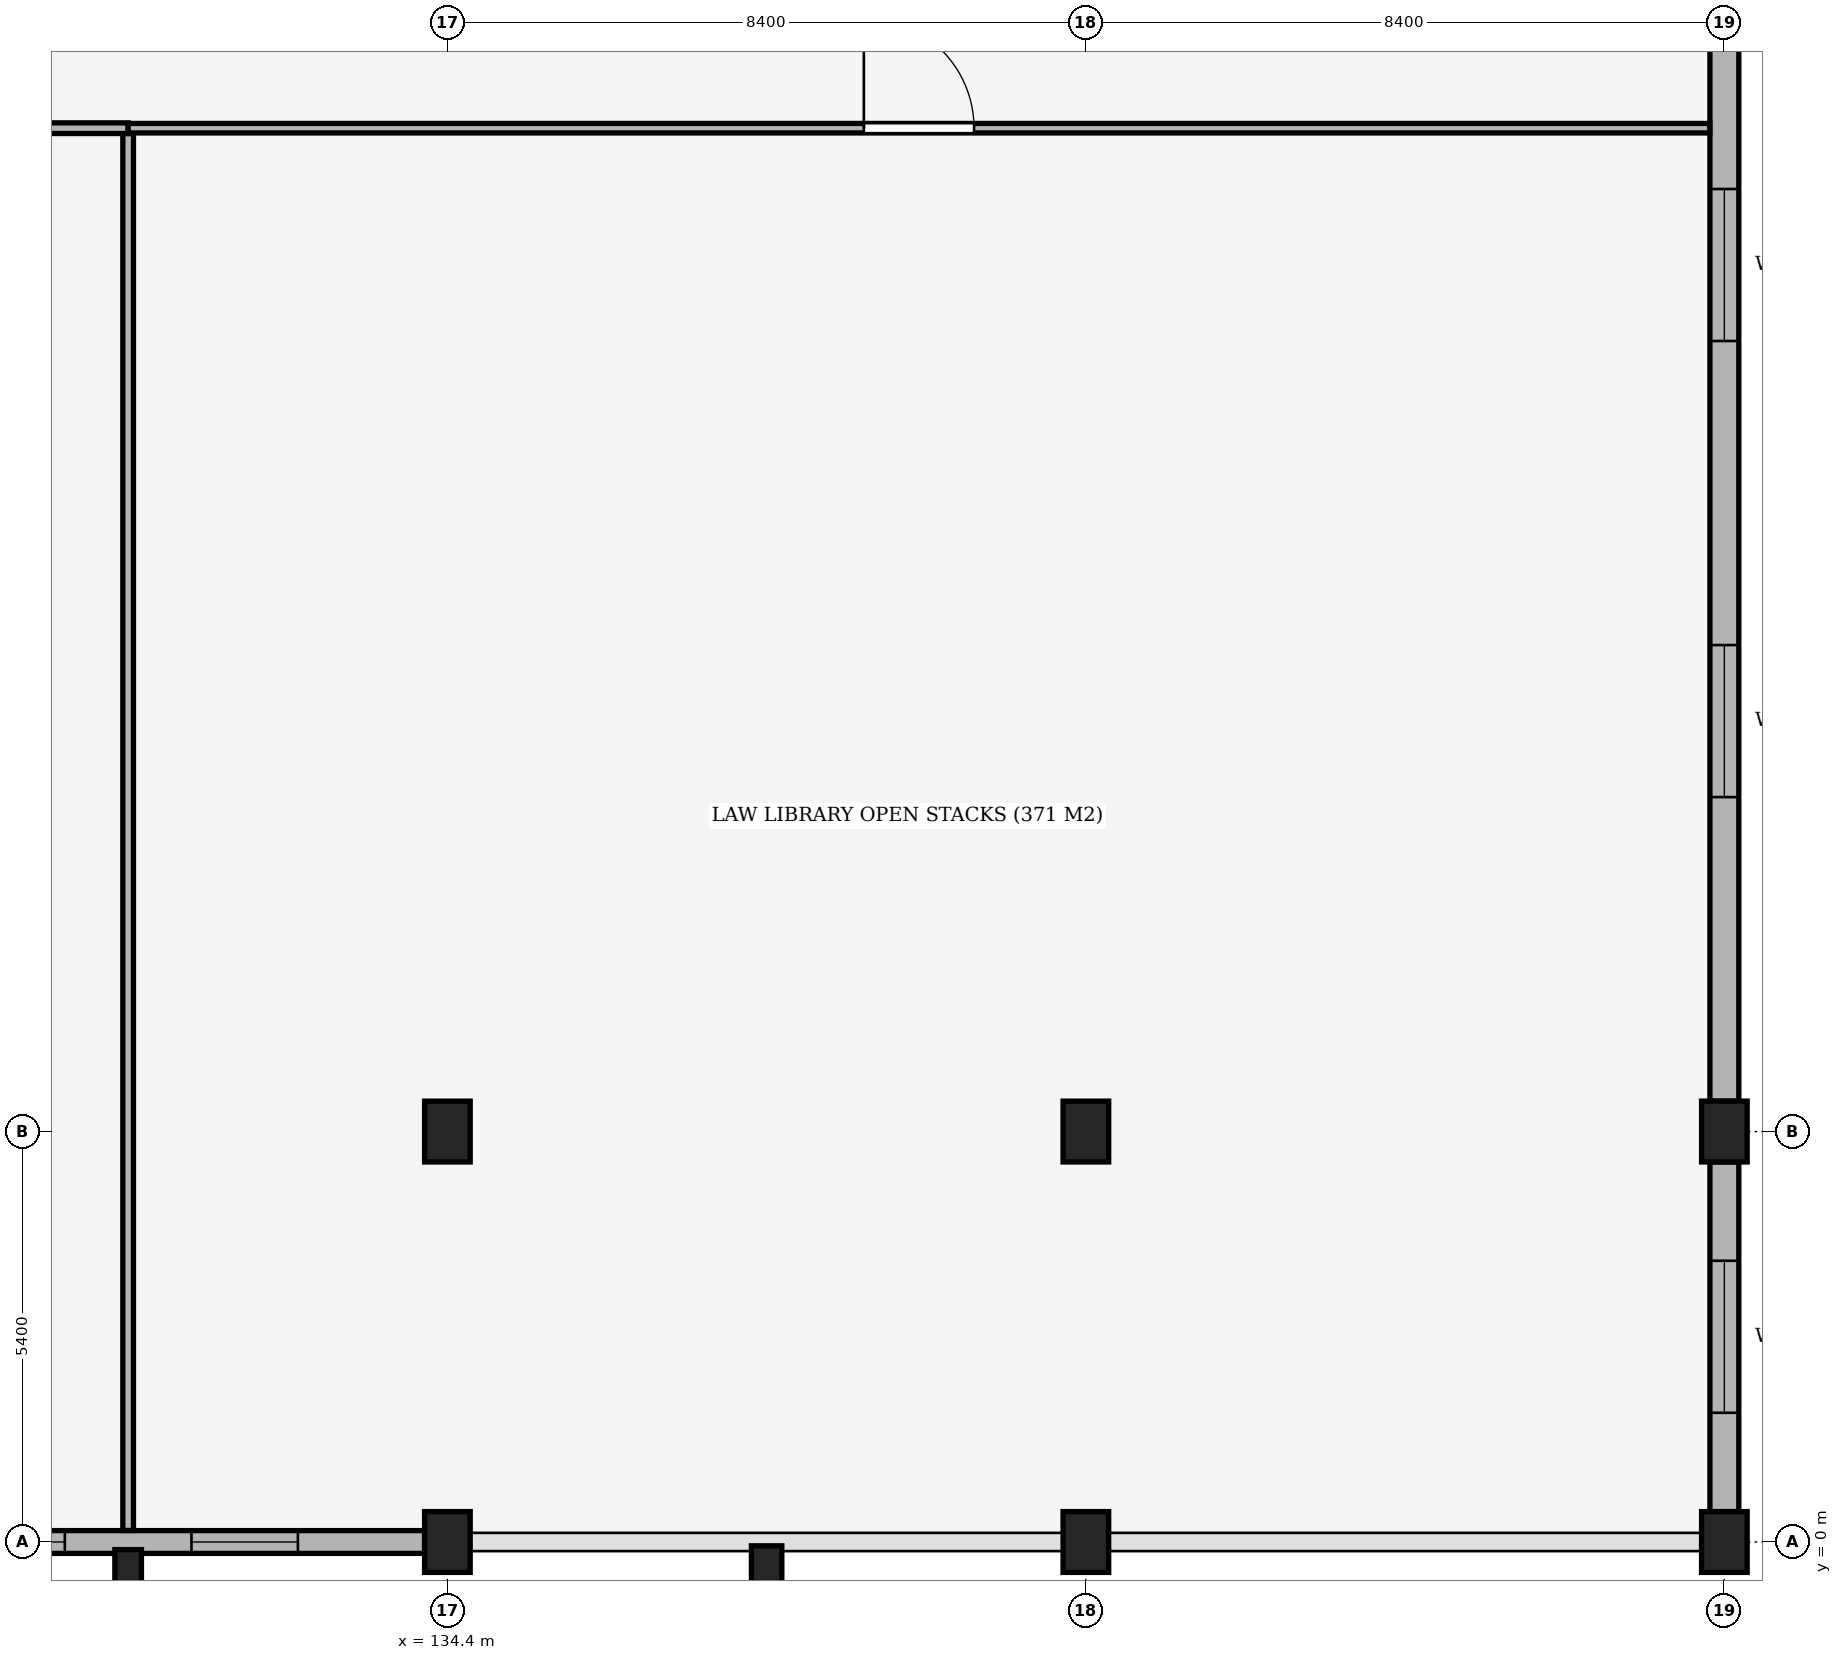
"""IFC4 building model, lengths in metres.
Left out: names, types, materials, properties, quantities, classifications, styles, units other than length and angle.
Written with IfcOpenShell. Run it as: python <this file> out.ifc"""

import sys

from ifc_helpers import new_model, si_unit, direction, frame, frame_2d, origin, origin_2d, place, context, subcontext, project, spatial, rectangle, extrude, element, fill, save


model = new_model("IFC4")
c1 = context("Model", 3, precision=1e-05, world=origin(), true_north=direction((0.0, 1.0)))
c2 = subcontext(c1, "Body", "Model", "MODEL_VIEW")
j1 = project(units=[si_unit("LENGTHUNIT", "METRE"), si_unit("PLANEANGLEUNIT", "RADIAN")], contexts=[c1])
p1 = place(None, origin())
s1 = spatial("IfcSite", under=j1, at=p1, CompositionType="ELEMENT")
p2 = place(p1, origin())
s2 = spatial("IfcBuilding", under=s1, at=p2, CompositionType="ELEMENT")
p3 = place(p2, frame((0.0, 0.0, 5.1)))
s3 = spatial("IfcBuildingStorey", under=s2, at=p3, CompositionType="ELEMENT", Elevation=5.1)
for number, where, z_axis, x_axis in (
    (1, (134.4, 0.0, 0.0), (0.0, 0.0, 1.0), (1.0, 0.0, 0.0)),
    (2, (134.4, 5.4, 0.0), (0.0, 0.0, 1.0), (1.0, 0.0, 0.0)),
    (3, (142.8, 0.0, 0.0), (0.0, 0.0, 1.0), (1.0, 0.0, 0.0)),
    (4, (142.8, 5.4, 0.0), (0.0, 0.0, 1.0), (1.0, 0.0, 0.0)),
    (5, (151.2, 0.0, 0.0), (0.0, 0.0, 1.0), (1.0, 0.0, 0.0)),
    (6, (151.2, 5.4, 0.0), (0.0, 0.0, 1.0), (1.0, 0.0, 0.0)),
):
    element("IfcColumn", number, at=place(p3, frame(where, z_axis=z_axis, x_axis=x_axis)), inside=s3, PredefinedType="COLUMN", context=c2, shape_type="SweptSolid", body=[
        extrude(rectangle(XDim=0.6, YDim=0.8, at=origin_2d()), origin(), (0.0, 0.0, 1.0), 5.1),
    ])
p4 = place(p3, frame((130.2, -0.35, 0.0), z_axis=(0.0, 0.0, 1.0), x_axis=(1.0, 0.0, 0.0)))
e7 = element("IfcColumn", 7, at=p4, inside=s3, PredefinedType="PILASTER", context=c2, shape_type="SweptSolid", body=[
    extrude(rectangle(XDim=0.35, YDim=0.5, at=origin_2d()), origin(), (0.0, 0.0, 1.0), 5.1),
])
p5 = place(p3, frame((138.6, -0.35, 0.0), z_axis=(0.0, 0.0, 1.0), x_axis=(1.0, 0.0, 0.0)))
e8 = element("IfcColumn", 8, at=p5, inside=s3, PredefinedType="PILASTER", context=c2, shape_type="SweptSolid", body=[
    extrude(rectangle(XDim=0.4, YDim=0.6, at=origin_2d()), origin(), (0.0, 0.0, 1.0), 5.1),
])
p6 = place(p3, frame((151.2, 21.8, 0.0), z_axis=(0.0, 0.0, 1.0), x_axis=(0.0, -1.0, 0.0)))
e9 = element("IfcWall", 9, at=p6, inside=s3, PredefinedType="SOLIDWALL", context=c2, shape_type="SweptSolid", body=[
    extrude(rectangle(XDim=16.0, YDim=0.38, at=frame_2d((8.0, 0.0))), origin(), (0.0, 0.0, 1.0), 3.67),
])
p7 = place(p6, frame((4.0, 0.0, 2.1)))
e10 = element("IfcOpeningElement", 10, at=p7, cuts=e9, PredefinedType="OPENING", context=c2, shape_type="SweptSolid", body=[
    extrude(rectangle(XDim=2.0, YDim=1.2, at=frame_2d((1.0, 0.6))), frame((0.0, 0.205, 0.0), z_axis=(0.0, -1.0, 0.0), x_axis=(1.0, 0.0, 0.0)), (0.0, 0.0, 1.0), 0.41),
])
p8 = place(p6, frame((10.0, 0.0, 2.1)))
e11 = element("IfcOpeningElement", 11, at=p8, cuts=e9, PredefinedType="OPENING", context=c2, shape_type="SweptSolid", body=[
    extrude(rectangle(XDim=2.0, YDim=1.2, at=frame_2d((1.0, 0.6))), frame((0.0, 0.205, 0.0), z_axis=(0.0, -1.0, 0.0), x_axis=(1.0, 0.0, 0.0)), (0.0, 0.0, 1.0), 0.41),
])
p9 = place(p3, frame((151.2, 5.0, 0.0), z_axis=(0.0, 0.0, 1.0), x_axis=(0.0, -1.0, 0.0)))
e12 = element("IfcWall", 12, at=p9, inside=s3, PredefinedType="SOLIDWALL", context=c2, shape_type="SweptSolid", body=[
    extrude(rectangle(XDim=4.6, YDim=0.38, at=frame_2d((2.3, 0.0))), origin(), (0.0, 0.0, 1.0), 4.27),
])
p10 = place(p9, frame((1.3, 0.0, 2.1)))
e13 = element("IfcOpeningElement", 13, at=p10, cuts=e12, PredefinedType="OPENING", context=c2, shape_type="SweptSolid", body=[
    extrude(rectangle(XDim=2.0, YDim=1.2, at=frame_2d((1.0, 0.6))), frame((0.0, 0.205, 0.0), z_axis=(0.0, -1.0, 0.0), x_axis=(1.0, 0.0, 0.0)), (0.0, 0.0, 1.0), 0.41),
])
p11 = place(p3, frame((134.1, 0.0, 0.0), z_axis=(0.0, 0.0, 1.0), x_axis=(-1.0, 0.0, 0.0)))
e14 = element("IfcWall", 14, at=p11, inside=s3, PredefinedType="SOLIDWALL", context=c2, shape_type="SweptSolid", body=[
    extrude(rectangle(XDim=7.8, YDim=0.3, at=frame_2d((3.9, 0.0))), origin(), (0.0, 0.0, 1.0), 4.07),
])
p12 = place(p11, frame((1.667, 0.0, 0.85)))
e15 = element("IfcOpeningElement", 15, at=p12, cuts=e14, PredefinedType="OPENING", context=c2, shape_type="SweptSolid", body=[
    extrude(rectangle(XDim=1.4, YDim=2.4, at=frame_2d((0.7, 1.2))), frame((0.0, 0.165, 0.0), z_axis=(0.0, -1.0, 0.0), x_axis=(1.0, 0.0, 0.0)), (0.0, 0.0, 1.0), 0.33),
])
p13 = place(p11, frame((4.733, 0.0, 0.85)))
e16 = element("IfcOpeningElement", 16, at=p13, cuts=e14, PredefinedType="OPENING", context=c2, shape_type="SweptSolid", body=[
    extrude(rectangle(XDim=1.4, YDim=2.4, at=frame_2d((0.7, 1.2))), frame((0.0, 0.165, 0.0), z_axis=(0.0, -1.0, 0.0), x_axis=(1.0, 0.0, 0.0)), (0.0, 0.0, 1.0), 0.33),
])
p14 = place(p3, frame((109.6, 18.6, 0.0), z_axis=(0.0, 0.0, 1.0), x_axis=(1.0, 0.0, 0.0)))
e17 = element("IfcWall", 17, at=p14, inside=s3, PredefinedType="PARTITIONING", context=c2, shape_type="SweptSolid", body=[
    extrude(rectangle(XDim=20.6, YDim=0.14, at=frame_2d((10.3, 0.0))), origin(), (0.0, 0.0, 1.0), 3.67),
])
p15 = place(p14, frame((9.675, 0.0, 0.0)))
e18 = element("IfcOpeningElement", 18, at=p15, cuts=e17, PredefinedType="OPENING", context=c2, shape_type="SweptSolid", body=[
    extrude(rectangle(XDim=1.25, YDim=2.2, at=frame_2d((0.625, 1.1))), frame((0.0, 0.085, 0.0), z_axis=(0.0, -1.0, 0.0), x_axis=(1.0, 0.0, 0.0)), (0.0, 0.0, 1.0), 0.17),
])
p16 = place(p3, frame((130.2, 18.6, 0.0), z_axis=(0.0, 0.0, 1.0), x_axis=(1.0, 0.0, 0.0)))
e19 = element("IfcWall", 19, at=p16, inside=s3, PredefinedType="PARTITIONING", context=c2, shape_type="SweptSolid", body=[
    extrude(rectangle(XDim=20.808, YDim=0.125, at=frame_2d((10.404, 0.0))), origin(), (0.0, 0.0, 1.0), 3.67),
])
p17 = place(p16, frame((9.679, 0.0, 0.0)))
e20 = element("IfcOpeningElement", 20, at=p17, cuts=e19, PredefinedType="OPENING", context=c2, shape_type="SweptSolid", body=[
    extrude(rectangle(XDim=1.45, YDim=2.25, at=frame_2d((0.725, 1.125))), frame((0.0, 0.077, 0.0), z_axis=(0.0, -1.0, 0.0), x_axis=(1.0, 0.0, 0.0)), (0.0, 0.0, 1.0), 0.155),
])
p18 = place(p3, frame((130.2, 0.152, 0.0), z_axis=(0.0, 0.0, 1.0), x_axis=(0.0, 1.0, 0.0)))
e21 = element("IfcWall", 21, at=p18, inside=s3, PredefinedType="PARTITIONING", context=c2, shape_type="SweptSolid", body=[
    extrude(rectangle(XDim=18.376, YDim=0.14, at=frame_2d((9.188, 0.0))), origin(), (0.0, 0.0, 1.0), 4.07),
])
p19 = place(p7, origin())
e22 = element("IfcWindow", 22, at=p19, inside=s3, PartitioningType="SINGLE_PANEL", PredefinedType="WINDOW", context=c2, shape_type="SweptSolid", body=[
    extrude(rectangle(XDim=2.0, YDim=1.2, at=frame_2d((1.0, 0.6))), frame((0.0, 0.03, 0.0), z_axis=(0.0, -1.0, 0.0), x_axis=(1.0, 0.0, 0.0)), (0.0, 0.0, 1.0), 0.06),
])
fill(e10, e22)
p20 = place(p8, origin())
e23 = element("IfcWindow", 23, at=p20, inside=s3, PartitioningType="SINGLE_PANEL", PredefinedType="WINDOW", context=c2, shape_type="SweptSolid", body=[
    extrude(rectangle(XDim=2.0, YDim=1.2, at=frame_2d((1.0, 0.6))), frame((0.0, 0.03, 0.0), z_axis=(0.0, -1.0, 0.0), x_axis=(1.0, 0.0, 0.0)), (0.0, 0.0, 1.0), 0.06),
])
fill(e11, e23)
p21 = place(p10, origin())
e24 = element("IfcWindow", 24, at=p21, inside=s3, PartitioningType="SINGLE_PANEL", PredefinedType="WINDOW", context=c2, shape_type="SweptSolid", body=[
    extrude(rectangle(XDim=2.0, YDim=1.2, at=frame_2d((1.0, 0.6))), frame((0.0, 0.03, 0.0), z_axis=(0.0, -1.0, 0.0), x_axis=(1.0, 0.0, 0.0)), (0.0, 0.0, 1.0), 0.06),
])
fill(e13, e24)
p22 = place(p12, origin())
e25 = element("IfcWindow", 25, at=p22, inside=s3, PartitioningType="SINGLE_PANEL", PredefinedType="WINDOW", context=c2, shape_type="SweptSolid", body=[
    extrude(rectangle(XDim=1.4, YDim=2.4, at=frame_2d((0.7, 1.2))), frame((0.0, 0.03, 0.0), z_axis=(0.0, -1.0, 0.0), x_axis=(1.0, 0.0, 0.0)), (0.0, 0.0, 1.0), 0.06),
])
fill(e15, e25)
p23 = place(p13, origin())
e26 = element("IfcWindow", 26, at=p23, inside=s3, PartitioningType="SINGLE_PANEL", PredefinedType="WINDOW", context=c2, shape_type="SweptSolid", body=[
    extrude(rectangle(XDim=1.4, YDim=2.4, at=frame_2d((0.7, 1.2))), frame((0.0, 0.03, 0.0), z_axis=(0.0, -1.0, 0.0), x_axis=(1.0, 0.0, 0.0)), (0.0, 0.0, 1.0), 0.06),
])
fill(e16, e26)
p24 = place(p17, origin())
e27 = element("IfcDoor", 27, at=p24, inside=s3, OperationType="SINGLE_SWING_LEFT", PredefinedType="DOOR", context=c2, shape_type="SweptSolid", body=[
    extrude(rectangle(XDim=1.45, YDim=2.25, at=frame_2d((0.725, 1.125))), frame((0.0, 0.025, 0.0), z_axis=(0.0, -1.0, 0.0), x_axis=(1.0, 0.0, 0.0)), (0.0, 0.0, 1.0), 0.05),
])
fill(e20, e27)
save(model, sys.argv[1])
